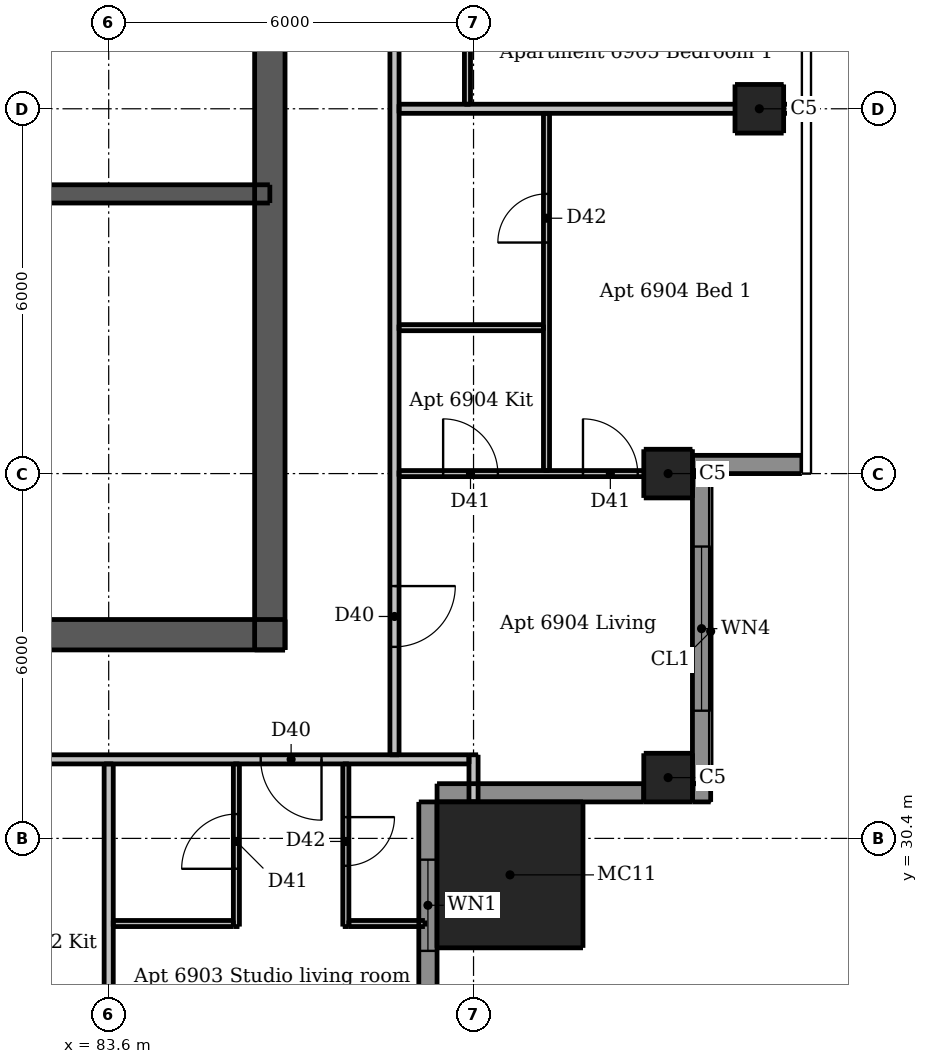
"""IFC4 building model, lengths in metres.
Left out: names, types, materials, properties, quantities, classifications, styles, units other than length and angle.
Written with IfcOpenShell. Run it as: python <this file> out.ifc"""

import sys

from ifc_helpers import new_model, si_unit, direction, frame, frame_2d, origin, origin_2d, place, context, subcontext, project, spatial, rectangle, extrude, element, fill, save


model = new_model("IFC4")
c1 = context("Model", 3, precision=1e-05, world=origin(), true_north=direction((0.0, 1.0)))
c2 = subcontext(c1, "Body", "Model", "MODEL_VIEW")
j1 = project(units=[si_unit("LENGTHUNIT", "METRE"), si_unit("PLANEANGLEUNIT", "RADIAN")], contexts=[c1])
p1 = place(None, origin())
s1 = spatial("IfcSite", under=j1, at=p1, CompositionType="ELEMENT")
p2 = place(p1, origin())
s2 = spatial("IfcBuilding", under=s1, at=p2, CompositionType="ELEMENT")
p3 = place(p2, frame((0.0, 0.0, 258.7)))
s3 = spatial("IfcBuildingStorey", under=s2, at=p3, CompositionType="ELEMENT", Elevation=258.7)
p4 = place(p3, frame((62.5, 33.75, 0.0), z_axis=(0.0, 0.0, 1.0), x_axis=(1.0, 0.0, 0.0)))
e1 = element("IfcWall", 1, at=p4, inside=s3, PredefinedType="SHEAR", context=c2, shape_type="SweptSolid", body=[
    extrude(rectangle(XDim=24.0, YDim=0.5, at=frame_2d((12.0, 0.0))), origin(), (0.0, 0.0, 1.0), 3.05),
])
p5 = place(p4, frame((1.875, 0.0, 0.0)))
e2 = element("IfcOpeningElement", 2, at=p5, cuts=e1, PredefinedType="OPENING", context=c2, shape_type="SweptSolid", body=[
    extrude(rectangle(XDim=1.1, YDim=2.1, at=frame_2d((0.55, 1.05))), frame((0.0, 0.26, 0.0), z_axis=(0.0, -1.0, 0.0), x_axis=(1.0, 0.0, 0.0)), (0.0, 0.0, 1.0), 0.52),
])
p6 = place(p4, frame((21.025, 0.0, 0.0)))
e3 = element("IfcOpeningElement", 3, at=p6, cuts=e1, PredefinedType="OPENING", context=c2, shape_type="SweptSolid", body=[
    extrude(rectangle(XDim=1.1, YDim=2.1, at=frame_2d((0.55, 1.05))), frame((0.0, 0.26, 0.0), z_axis=(0.0, -1.0, 0.0), x_axis=(1.0, 0.0, 0.0)), (0.0, 0.0, 1.0), 0.52),
])
p7 = place(p4, frame((8.0, 0.0, 0.0)))
e4 = element("IfcOpeningElement", 4, at=p7, cuts=e1, PredefinedType="OPENING", context=c2, shape_type="SweptSolid", body=[
    extrude(rectangle(XDim=1.1, YDim=2.1, at=frame_2d((0.55, 1.05))), frame((0.0, 0.26, 0.0), z_axis=(0.0, -1.0, 0.0), x_axis=(1.0, 0.0, 0.0)), (0.0, 0.0, 1.0), 0.52),
])
p8 = place(p4, frame((13.5, 0.0, 0.0)))
e5 = element("IfcOpeningElement", 5, at=p8, cuts=e1, PredefinedType="OPENING", context=c2, shape_type="SweptSolid", body=[
    extrude(rectangle(XDim=0.9, YDim=2.1, at=frame_2d((0.45, 1.05))), frame((0.0, 0.26, 0.0), z_axis=(0.0, -1.0, 0.0), x_axis=(1.0, 0.0, 0.0)), (0.0, 0.0, 1.0), 0.52),
])
p9 = place(p4, frame((17.1, 0.0, 0.0)))
e6 = element("IfcOpeningElement", 6, at=p9, cuts=e1, PredefinedType="OPENING", context=c2, shape_type="SweptSolid", body=[
    extrude(rectangle(XDim=0.9, YDim=2.1, at=frame_2d((0.45, 1.05))), frame((0.0, 0.26, 0.0), z_axis=(0.0, -1.0, 0.0), x_axis=(1.0, 0.0, 0.0)), (0.0, 0.0, 1.0), 0.52),
])
p10 = place(p3, frame((86.25, 33.5, 0.0), z_axis=(0.0, 0.0, 1.0), x_axis=(0.0, 1.0, 0.0)))
e7 = element("IfcWall", 7, at=p10, inside=s3, PredefinedType="SHEAR", context=c2, shape_type="SweptSolid", body=[
    extrude(rectangle(XDim=24.0, YDim=0.5, at=frame_2d((12.0, 0.0))), origin(), (0.0, 0.0, 1.0), 3.05),
])
p11 = place(p10, frame((11.2, 0.0, 0.0)))
e8 = element("IfcOpeningElement", 8, at=p11, cuts=e7, PredefinedType="OPENING", context=c2, shape_type="SweptSolid", body=[
    extrude(rectangle(XDim=1.6, YDim=2.1, at=frame_2d((0.8, 1.05))), frame((0.0, 0.26, 0.0), z_axis=(0.0, -1.0, 0.0), x_axis=(1.0, 0.0, 0.0)), (0.0, 0.0, 1.0), 0.52),
])
p12 = place(p3, frame((62.75, 41.0, 0.0), z_axis=(0.0, 0.0, 1.0), x_axis=(1.0, 0.0, 0.0)))
e9 = element("IfcWall", 9, at=p12, inside=s3, PredefinedType="SHEAR", context=c2, shape_type="SweptSolid", body=[
    extrude(rectangle(XDim=23.5, YDim=0.3, at=frame_2d((11.75, 0.0))), origin(), (0.0, 0.0, 1.0), 3.05),
])
for number, where, z_axis, x_axis in (
    (10, (92.8, 31.4, 0.0), (0.0, 0.0, 1.0), (1.0, 0.0, 0.0)),
    (11, (92.8, 36.4, 0.0), (0.0, 0.0, 1.0), (1.0, 0.0, 0.0)),
    (12, (94.3, 42.4, 0.0), (0.0, 0.0, 1.0), (1.0, 0.0, 0.0)),
):
    element("IfcColumn", number, at=place(p3, frame(where, z_axis=z_axis, x_axis=x_axis)), inside=s3, PredefinedType="COLUMN", context=c2, shape_type="SweptSolid", body=[
        extrude(rectangle(XDim=0.8, YDim=0.8, at=origin_2d()), origin(), (0.0, 0.0, 1.0), 3.05),
    ])
p13 = place(p3, frame((90.2, 29.8, 0.0), z_axis=(0.0, 0.0, 1.0), x_axis=(1.0, 0.0, 0.0)))
e13 = element("IfcColumn", 13, at=p13, inside=s3, PredefinedType="COLUMN", context=c2, shape_type="SweptSolid", body=[
    extrude(rectangle(XDim=2.4, YDim=2.4, at=origin_2d()), origin(), (0.0, 0.0, 1.0), 3.3),
])
p14 = place(p3, frame((88.85, 27.6, 0.0), z_axis=(0.0, 0.0, 1.0), x_axis=(0.0, 1.0, 0.0)))
e14 = element("IfcWall", 14, at=p14, inside=s3, PredefinedType="SOLIDWALL", context=c2, shape_type="SweptSolid", body=[
    extrude(rectangle(XDim=3.4, YDim=0.3, at=frame_2d((1.7, 0.0))), origin(), (0.0, 0.0, 1.0), 3.05),
])
p15 = place(p14, frame((0.95, 0.0, 0.9)))
e15 = element("IfcOpeningElement", 15, at=p15, cuts=e14, PredefinedType="OPENING", context=c2, shape_type="SweptSolid", body=[
    extrude(rectangle(XDim=1.5, YDim=1.5, at=frame_2d((0.75, 0.75))), frame((0.0, 0.16, 0.0), z_axis=(0.0, -1.0, 0.0), x_axis=(1.0, 0.0, 0.0)), (0.0, 0.0, 1.0), 0.32),
])
p16 = place(p3, frame((89.0, 31.15, 0.0), z_axis=(0.0, 0.0, 1.0), x_axis=(1.0, 0.0, 0.0)))
e16 = element("IfcWall", 16, at=p16, inside=s3, PredefinedType="SOLIDWALL", context=c2, shape_type="SweptSolid", body=[
    extrude(rectangle(XDim=3.4, YDim=0.3, at=frame_2d((1.7, 0.0))), origin(), (0.0, 0.0, 1.0), 3.05),
])
p17 = place(p3, frame((93.2, 31.15, 0.0), z_axis=(0.0, 0.0, 1.0), x_axis=(1.0, 0.0, 0.0)))
e17 = element("IfcWall", 17, at=p17, inside=s3, PredefinedType="SOLIDWALL", context=c2, shape_type="SweptSolid", body=[
    extrude(rectangle(XDim=0.3, YDim=0.3, at=frame_2d((0.15, 0.0))), origin(), (0.0, 0.0, 1.0), 3.05),
])
p18 = place(p3, frame((93.2, 36.55, 0.0), z_axis=(0.0, 0.0, 1.0), x_axis=(1.0, 0.0, 0.0)))
e18 = element("IfcWall", 18, at=p18, inside=s3, PredefinedType="SOLIDWALL", context=c2, shape_type="SweptSolid", body=[
    extrude(rectangle(XDim=1.8, YDim=0.3, at=frame_2d((0.9, 0.0))), origin(), (0.0, 0.0, 1.0), 3.05),
])
p19 = place(p3, frame((93.35, 31.3, 0.0), z_axis=(0.0, 0.0, 1.0), x_axis=(0.0, 1.0, 0.0)))
e19 = element("IfcWall", 19, at=p19, inside=s3, PredefinedType="SOLIDWALL", context=c2, shape_type="SweptSolid", body=[
    extrude(rectangle(XDim=5.1, YDim=0.3, at=frame_2d((2.55, 0.0))), origin(), (0.0, 0.0, 1.0), 3.05),
])
p20 = place(p19, frame((1.2, 0.0, 0.15)))
e20 = element("IfcOpeningElement", 20, at=p20, cuts=e19, PredefinedType="OPENING", context=c2, shape_type="SweptSolid", body=[
    extrude(rectangle(XDim=2.7, YDim=2.1, at=frame_2d((1.35, 1.05))), frame((0.0, 0.16, 0.0), z_axis=(0.0, -1.0, 0.0), x_axis=(1.0, 0.0, 0.0)), (0.0, 0.0, 1.0), 0.32),
])
p21 = place(p3, frame((85.7, 28.95, 0.0), z_axis=(0.0, 0.0, 1.0), x_axis=(0.0, 1.0, 0.0)))
e21 = element("IfcWall", 21, at=p21, inside=s3, PredefinedType="PARTITIONING", context=c2, shape_type="SweptSolid", body=[
    extrude(rectangle(XDim=2.675, YDim=0.1, at=frame_2d((1.337, 0.0))), origin(), (0.0, 0.0, 1.0), 3.05),
])
p22 = place(p21, frame((0.95, 0.0, 0.0)))
e22 = element("IfcOpeningElement", 22, at=p22, cuts=e21, PredefinedType="OPENING", context=c2, shape_type="SweptSolid", body=[
    extrude(rectangle(XDim=0.9, YDim=2.1, at=frame_2d((0.45, 1.05))), frame((0.0, 0.06, 0.0), z_axis=(0.0, -1.0, 0.0), x_axis=(1.0, 0.0, 0.0)), (0.0, 0.0, 1.0), 0.12),
])
p23 = place(p3, frame((87.5, 31.625, 0.0), z_axis=(0.0, 0.0, 1.0), x_axis=(0.0, -1.0, 0.0)))
e23 = element("IfcWall", 23, at=p23, inside=s3, PredefinedType="PARTITIONING", context=c2, shape_type="SweptSolid", body=[
    extrude(rectangle(XDim=2.675, YDim=0.1, at=frame_2d((1.337, 0.0))), origin(), (0.0, 0.0, 1.0), 3.05),
])
p24 = place(p23, frame((0.875, 0.0, 0.0)))
e24 = element("IfcOpeningElement", 24, at=p24, cuts=e23, PredefinedType="OPENING", context=c2, shape_type="SweptSolid", body=[
    extrude(rectangle(XDim=0.8, YDim=2.1, at=frame_2d((0.4, 1.05))), frame((0.0, 0.06, 0.0), z_axis=(0.0, -1.0, 0.0), x_axis=(1.0, 0.0, 0.0)), (0.0, 0.0, 1.0), 0.12),
])
p25 = place(p3, frame((89.5, 60.325, 0.0), z_axis=(0.0, 0.0, 1.0), x_axis=(0.0, -1.0, 0.0)))
e25 = element("IfcWall", 25, at=p25, inside=s3, PredefinedType="PARTITIONING", context=c2, shape_type="SweptSolid", body=[
    extrude(rectangle(XDim=17.85, YDim=0.1, at=frame_2d((8.925, 0.0))), origin(), (0.0, 0.0, 1.0), 3.05),
])
p26 = place(p25, frame((4.575, 0.0, 0.0)))
e26 = element("IfcOpeningElement", 26, at=p26, cuts=e25, PredefinedType="OPENING", context=c2, shape_type="SweptSolid", body=[
    extrude(rectangle(XDim=0.9, YDim=2.1, at=frame_2d((0.45, 1.05))), frame((0.0, 0.06, 0.0), z_axis=(0.0, -1.0, 0.0), x_axis=(1.0, 0.0, 0.0)), (0.0, 0.0, 1.0), 0.12),
])
p27 = place(p25, frame((0.675, 0.0, 0.0)))
e27 = element("IfcOpeningElement", 27, at=p27, cuts=e25, PredefinedType="OPENING", context=c2, shape_type="SweptSolid", body=[
    extrude(rectangle(XDim=0.9, YDim=2.1, at=frame_2d((0.45, 1.05))), frame((0.0, 0.06, 0.0), z_axis=(0.0, -1.0, 0.0), x_axis=(1.0, 0.0, 0.0)), (0.0, 0.0, 1.0), 0.12),
])
p28 = place(p25, frame((2.775, 0.0, 0.0)))
e28 = element("IfcOpeningElement", 28, at=p28, cuts=e25, PredefinedType="OPENING", context=c2, shape_type="SweptSolid", body=[
    extrude(rectangle(XDim=0.9, YDim=2.1, at=frame_2d((0.45, 1.05))), frame((0.0, 0.06, 0.0), z_axis=(0.0, -1.0, 0.0), x_axis=(1.0, 0.0, 0.0)), (0.0, 0.0, 1.0), 0.12),
])
p29 = place(p25, frame((15.675, 0.0, 0.0)))
e29 = element("IfcOpeningElement", 29, at=p29, cuts=e25, PredefinedType="OPENING", context=c2, shape_type="SweptSolid", body=[
    extrude(rectangle(XDim=0.9, YDim=2.1, at=frame_2d((0.45, 1.05))), frame((0.0, 0.06, 0.0), z_axis=(0.0, -1.0, 0.0), x_axis=(1.0, 0.0, 0.0)), (0.0, 0.0, 1.0), 0.12),
])
p30 = place(p25, frame((9.675, 0.0, 0.0)))
e30 = element("IfcOpeningElement", 30, at=p30, cuts=e25, PredefinedType="OPENING", context=c2, shape_type="SweptSolid", body=[
    extrude(rectangle(XDim=0.9, YDim=2.1, at=frame_2d((0.45, 1.05))), frame((0.0, 0.06, 0.0), z_axis=(0.0, -1.0, 0.0), x_axis=(1.0, 0.0, 0.0)), (0.0, 0.0, 1.0), 0.12),
])
p31 = place(p25, frame((12.725, 0.0, 0.0)))
e31 = element("IfcOpeningElement", 31, at=p31, cuts=e25, PredefinedType="OPENING", context=c2, shape_type="SweptSolid", body=[
    extrude(rectangle(XDim=0.8, YDim=2.1, at=frame_2d((0.4, 1.05))), frame((0.0, 0.06, 0.0), z_axis=(0.0, -1.0, 0.0), x_axis=(1.0, 0.0, 0.0)), (0.0, 0.0, 1.0), 0.12),
])
p32 = place(p25, frame((6.725, 0.0, 0.0)))
e32 = element("IfcOpeningElement", 32, at=p32, cuts=e25, PredefinedType="OPENING", context=c2, shape_type="SweptSolid", body=[
    extrude(rectangle(XDim=0.8, YDim=2.1, at=frame_2d((0.4, 1.05))), frame((0.0, 0.06, 0.0), z_axis=(0.0, -1.0, 0.0), x_axis=(1.0, 0.0, 0.0)), (0.0, 0.0, 1.0), 0.12),
])
p33 = place(p3, frame((90.8, 36.45, 0.0), z_axis=(0.0, 0.0, 1.0), x_axis=(0.0, 1.0, 0.0)))
e33 = element("IfcWall", 33, at=p33, inside=s3, PredefinedType="PARTITIONING", context=c2, shape_type="SweptSolid", body=[
    extrude(rectangle(XDim=5.875, YDim=0.1, at=frame_2d((2.938, 0.0))), origin(), (0.0, 0.0, 1.0), 3.05),
])
p34 = place(p33, frame((3.75, 0.0, 0.0)))
e34 = element("IfcOpeningElement", 34, at=p34, cuts=e33, PredefinedType="OPENING", context=c2, shape_type="SweptSolid", body=[
    extrude(rectangle(XDim=0.8, YDim=2.1, at=frame_2d((0.4, 1.05))), frame((0.0, 0.06, 0.0), z_axis=(0.0, -1.0, 0.0), x_axis=(1.0, 0.0, 0.0)), (0.0, 0.0, 1.0), 0.12),
])
p35 = place(p3, frame((88.375, 38.8, 0.0), z_axis=(0.0, 0.0, 1.0), x_axis=(1.0, 0.0, 0.0)))
e35 = element("IfcWall", 35, at=p35, inside=s3, PredefinedType="PARTITIONING", context=c2, shape_type="SweptSolid", body=[
    extrude(rectangle(XDim=2.375, YDim=0.1, at=frame_2d((1.188, 0.0))), origin(), (0.0, 0.0, 1.0), 3.05),
])
p36 = place(p3, frame((88.375, 36.4, 0.0), z_axis=(0.0, 0.0, 1.0), x_axis=(1.0, 0.0, 0.0)))
e36 = element("IfcWall", 36, at=p36, inside=s3, PredefinedType="PARTITIONING", context=c2, shape_type="SweptSolid", body=[
    extrude(rectangle(XDim=5.125, YDim=0.1, at=frame_2d((2.562, 0.0))), origin(), (0.0, 0.0, 1.0), 2.647),
])
p37 = place(p36, frame((0.725, 0.0, 0.0)))
e37 = element("IfcOpeningElement", 37, at=p37, cuts=e36, PredefinedType="OPENING", context=c2, shape_type="SweptSolid", body=[
    extrude(rectangle(XDim=0.9, YDim=2.1, at=frame_2d((0.45, 1.05))), frame((0.0, 0.06, 0.0), z_axis=(0.0, -1.0, 0.0), x_axis=(1.0, 0.0, 0.0)), (0.0, 0.0, 1.0), 0.12),
])
p38 = place(p36, frame((3.025, 0.0, 0.0)))
e38 = element("IfcOpeningElement", 38, at=p38, cuts=e36, PredefinedType="OPENING", context=c2, shape_type="SweptSolid", body=[
    extrude(rectangle(XDim=0.9, YDim=2.1, at=frame_2d((0.45, 1.05))), frame((0.0, 0.06, 0.0), z_axis=(0.0, -1.0, 0.0), x_axis=(1.0, 0.0, 0.0)), (0.0, 0.0, 1.0), 0.12),
])
p39 = place(p3, frame((83.675, 29.0, 0.0), z_axis=(0.0, 0.0, 1.0), x_axis=(1.0, 0.0, 0.0)))
e39 = element("IfcWall", 39, at=p39, inside=s3, PredefinedType="PARTITIONING", context=c2, shape_type="SweptSolid", body=[
    extrude(rectangle(XDim=1.975, YDim=0.1, at=frame_2d((0.987, 0.0))), origin(), (0.0, 0.0, 1.0), 3.05),
])
p40 = place(p3, frame((87.55, 29.0, 0.0), z_axis=(0.0, 0.0, 1.0), x_axis=(1.0, 0.0, 0.0)))
e40 = element("IfcWall", 40, at=p40, inside=s3, PredefinedType="PARTITIONING", context=c2, shape_type="SweptSolid", body=[
    extrude(rectangle(XDim=1.25, YDim=0.1, at=frame_2d((0.625, 0.0))), origin(), (0.0, 0.0, 1.0), 3.05),
])
p41 = place(p3, frame((83.6, 26.5, 0.0), z_axis=(0.0, 0.0, 1.0), x_axis=(0.0, 1.0, 0.0)))
e41 = element("IfcWall", 41, at=p41, inside=s3, PredefinedType="PARTITIONING", context=c2, shape_type="SweptSolid", body=[
    extrude(rectangle(XDim=5.125, YDim=0.15, at=frame_2d((2.562, 0.0))), origin(), (0.0, 0.0, 1.0), 2.647),
])
p42 = place(p3, frame((88.3, 61.175, 0.0), z_axis=(0.0, 0.0, 1.0), x_axis=(0.0, -1.0, 0.0)))
e42 = element("IfcWall", 42, at=p42, inside=s3, PredefinedType="PARTITIONING", context=c2, shape_type="SweptSolid", body=[
    extrude(rectangle(XDim=29.4, YDim=0.15, at=frame_2d((14.7, 0.0))), origin(), (0.0, 0.0, 1.0), 3.05),
])
p43 = place(p42, frame((26.625, 0.0, 0.0)))
e43 = element("IfcOpeningElement", 43, at=p43, cuts=e42, PredefinedType="OPENING", context=c2, shape_type="SweptSolid", body=[
    extrude(rectangle(XDim=1.0, YDim=2.1, at=frame_2d((0.5, 1.05))), frame((0.0, 0.085, 0.0), z_axis=(0.0, -1.0, 0.0), x_axis=(1.0, 0.0, 0.0)), (0.0, 0.0, 1.0), 0.17),
])
p44 = place(p42, frame((9.275, 0.0, 0.0)))
e44 = element("IfcOpeningElement", 44, at=p44, cuts=e42, PredefinedType="OPENING", context=c2, shape_type="SweptSolid", body=[
    extrude(rectangle(XDim=1.0, YDim=2.1, at=frame_2d((0.5, 1.05))), frame((0.0, 0.085, 0.0), z_axis=(0.0, -1.0, 0.0), x_axis=(1.0, 0.0, 0.0)), (0.0, 0.0, 1.0), 0.17),
])
p45 = place(p3, frame((89.6, 31.0, 0.0), z_axis=(0.0, 0.0, 1.0), x_axis=(0.0, 1.0, 0.0)))
e45 = element("IfcWall", 45, at=p45, inside=s3, PredefinedType="PARTITIONING", context=c2, shape_type="SweptSolid", body=[
    extrude(rectangle(XDim=0.775, YDim=0.15, at=frame_2d((0.387, 0.0))), origin(), (0.0, 0.0, 1.0), 3.05),
])
p46 = place(p3, frame((88.375, 42.4, 0.0), z_axis=(0.0, 0.0, 1.0), x_axis=(1.0, 0.0, 0.0)))
e46 = element("IfcWall", 46, at=p46, inside=s3, PredefinedType="PARTITIONING", context=c2, shape_type="SweptSolid", body=[
    extrude(rectangle(XDim=6.625, YDim=0.15, at=frame_2d((3.312, 0.0))), origin(), (0.0, 0.0, 1.0), 2.589),
])
p47 = place(p3, frame((89.525, 31.7, 0.0), z_axis=(0.0, 0.0, 1.0), x_axis=(-1.0, 0.0, 0.0)))
e47 = element("IfcWall", 47, at=p47, inside=s3, PredefinedType="PARTITIONING", context=c2, shape_type="SweptSolid", body=[
    extrude(rectangle(XDim=30.55, YDim=0.15, at=frame_2d((15.275, 0.0))), origin(), (0.0, 0.0, 1.0), 3.05),
])
p48 = place(p47, frame((26.775, 0.0, 0.0)))
e48 = element("IfcOpeningElement", 48, at=p48, cuts=e47, PredefinedType="OPENING", context=c2, shape_type="SweptSolid", body=[
    extrude(rectangle(XDim=1.0, YDim=2.1, at=frame_2d((0.5, 1.05))), frame((0.0, 0.085, 0.0), z_axis=(0.0, -1.0, 0.0), x_axis=(1.0, 0.0, 0.0)), (0.0, 0.0, 1.0), 0.17),
])
p49 = place(p47, frame((9.625, 0.0, 0.0)))
e49 = element("IfcOpeningElement", 49, at=p49, cuts=e47, PredefinedType="OPENING", context=c2, shape_type="SweptSolid", body=[
    extrude(rectangle(XDim=1.0, YDim=2.1, at=frame_2d((0.5, 1.05))), frame((0.0, 0.085, 0.0), z_axis=(0.0, -1.0, 0.0), x_axis=(1.0, 0.0, 0.0)), (0.0, 0.0, 1.0), 0.17),
])
p50 = place(p47, frame((2.425, 0.0, 0.0)))
e50 = element("IfcOpeningElement", 50, at=p50, cuts=e47, PredefinedType="OPENING", context=c2, shape_type="SweptSolid", body=[
    extrude(rectangle(XDim=1.0, YDim=2.1, at=frame_2d((0.5, 1.05))), frame((0.0, 0.085, 0.0), z_axis=(0.0, -1.0, 0.0), x_axis=(1.0, 0.0, 0.0)), (0.0, 0.0, 1.0), 0.17),
])
p51 = place(p15, origin())
e51 = element("IfcWindow", 51, at=p51, inside=s3, PartitioningType="DOUBLE_PANEL_VERTICAL", PredefinedType="WINDOW", context=c2, shape_type="SweptSolid", body=[
    extrude(rectangle(XDim=1.5, YDim=1.5, at=frame_2d((0.75, 0.75))), frame((0.0, 0.03, 0.0), z_axis=(0.0, -1.0, 0.0), x_axis=(1.0, 0.0, 0.0)), (0.0, 0.0, 1.0), 0.06),
])
fill(e15, e51)
p52 = place(p20, origin())
e52 = element("IfcWindow", 52, at=p52, inside=s3, PartitioningType="DOUBLE_PANEL_VERTICAL", PredefinedType="WINDOW", context=c2, shape_type="SweptSolid", body=[
    extrude(rectangle(XDim=2.7, YDim=2.1, at=frame_2d((1.35, 1.05))), frame((0.0, 0.03, 0.0), z_axis=(0.0, -1.0, 0.0), x_axis=(1.0, 0.0, 0.0)), (0.0, 0.0, 1.0), 0.06),
])
fill(e20, e52)
p53 = place(p6, origin())
e53 = element("IfcDoor", 53, at=p53, inside=s3, OperationType="SINGLE_SWING_RIGHT", PredefinedType="DOOR", context=c2, shape_type="SweptSolid", body=[
    extrude(rectangle(XDim=1.1, YDim=2.1, at=frame_2d((0.55, 1.05))), frame((0.0, 0.237, 0.0), z_axis=(0.0, -1.0, 0.0), x_axis=(1.0, 0.0, 0.0)), (0.0, 0.0, 1.0), 0.05),
])
fill(e3, e53)
p54 = place(p50, origin())
e54 = element("IfcDoor", 54, at=p54, inside=s3, OperationType="SINGLE_SWING_LEFT", PredefinedType="DOOR", context=c2, shape_type="SweptSolid", body=[
    extrude(rectangle(XDim=1.0, YDim=2.1, at=frame_2d((0.5, 1.05))), frame((0.0, 0.025, 0.0), z_axis=(0.0, -1.0, 0.0), x_axis=(1.0, 0.0, 0.0)), (0.0, 0.0, 1.0), 0.05),
])
fill(e50, e54)
p55 = place(p22, origin())
e55 = element("IfcDoor", 55, at=p55, inside=s3, OperationType="SINGLE_SWING_LEFT", PredefinedType="DOOR", context=c2, shape_type="SweptSolid", body=[
    extrude(rectangle(XDim=0.9, YDim=2.1, at=frame_2d((0.45, 1.05))), frame((0.0, 0.025, 0.0), z_axis=(0.0, -1.0, 0.0), x_axis=(1.0, 0.0, 0.0)), (0.0, 0.0, 1.0), 0.05),
])
fill(e22, e55)
p56 = place(p24, origin())
e56 = element("IfcDoor", 56, at=p56, inside=s3, OperationType="SINGLE_SWING_LEFT", PredefinedType="DOOR", context=c2, shape_type="SweptSolid", body=[
    extrude(rectangle(XDim=0.8, YDim=2.1, at=frame_2d((0.4, 1.05))), frame((0.0, 0.025, 0.0), z_axis=(0.0, -1.0, 0.0), x_axis=(1.0, 0.0, 0.0)), (0.0, 0.0, 1.0), 0.05),
])
fill(e24, e56)
p57 = place(p43, origin())
e57 = element("IfcDoor", 57, at=p57, inside=s3, OperationType="SINGLE_SWING_LEFT", PredefinedType="DOOR", context=c2, shape_type="SweptSolid", body=[
    extrude(rectangle(XDim=1.0, YDim=2.1, at=frame_2d((0.5, 1.05))), frame((0.0, 0.025, 0.0), z_axis=(0.0, -1.0, 0.0), x_axis=(1.0, 0.0, 0.0)), (0.0, 0.0, 1.0), 0.05),
])
fill(e43, e57)
p58 = place(p37, origin())
e58 = element("IfcDoor", 58, at=p58, inside=s3, OperationType="SINGLE_SWING_LEFT", PredefinedType="DOOR", context=c2, shape_type="SweptSolid", body=[
    extrude(rectangle(XDim=0.9, YDim=2.1, at=frame_2d((0.45, 1.05))), frame((0.0, 0.025, 0.0), z_axis=(0.0, -1.0, 0.0), x_axis=(1.0, 0.0, 0.0)), (0.0, 0.0, 1.0), 0.05),
])
fill(e37, e58)
p59 = place(p38, origin())
e59 = element("IfcDoor", 59, at=p59, inside=s3, OperationType="SINGLE_SWING_LEFT", PredefinedType="DOOR", context=c2, shape_type="SweptSolid", body=[
    extrude(rectangle(XDim=0.9, YDim=2.1, at=frame_2d((0.45, 1.05))), frame((0.0, 0.025, 0.0), z_axis=(0.0, -1.0, 0.0), x_axis=(1.0, 0.0, 0.0)), (0.0, 0.0, 1.0), 0.05),
])
fill(e38, e59)
p60 = place(p34, origin())
e60 = element("IfcDoor", 60, at=p60, inside=s3, OperationType="SINGLE_SWING_LEFT", PredefinedType="DOOR", context=c2, shape_type="SweptSolid", body=[
    extrude(rectangle(XDim=0.8, YDim=2.1, at=frame_2d((0.4, 1.05))), frame((0.0, 0.025, 0.0), z_axis=(0.0, -1.0, 0.0), x_axis=(1.0, 0.0, 0.0)), (0.0, 0.0, 1.0), 0.05),
])
fill(e34, e60)
save(model, sys.argv[1])
